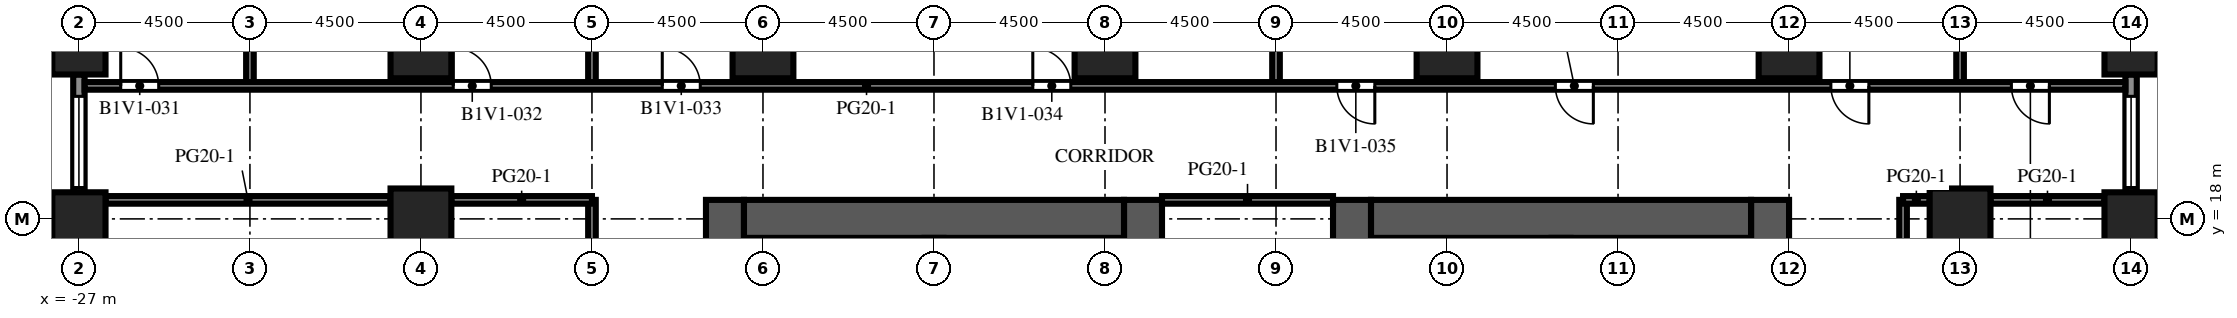
"""IFC4 building model, lengths in metres.
Left out: names, types, materials, properties, quantities, classifications, styles, units other than length and angle.
Written with IfcOpenShell. Run it as: python <this file> out.ifc"""

import sys

from ifc_helpers import new_model, si_unit, direction, frame, frame_2d, origin, origin_2d, place, context, subcontext, project, spatial, rectangle, extrude, element, fill, save


model = new_model("IFC4")
c1 = context("Model", 3, precision=1e-05, world=origin(), true_north=direction((0.0, 1.0)))
c2 = subcontext(c1, "Body", "Model", "MODEL_VIEW")
j1 = project(units=[si_unit("LENGTHUNIT", "METRE"), si_unit("PLANEANGLEUNIT", "RADIAN")], contexts=[c1])
p1 = place(None, origin())
s1 = spatial("IfcSite", under=j1, at=p1, CompositionType="ELEMENT")
p2 = place(p1, origin())
s2 = spatial("IfcBuilding", under=s1, at=p2, CompositionType="ELEMENT")
p3 = place(p2, frame((0.0, 0.0, 23.6)))
s3 = spatial("IfcBuildingStorey", under=s2, at=p3, CompositionType="ELEMENT", Elevation=23.6)
for number, where, z_axis, x_axis in (
    (1, (-27.0, 18.0, 0.0), (0.0, 0.0, 1.0), (1.0, 0.0, 0.0)),
    (2, (-27.0, 22.5, 0.0), (0.0, 0.0, 1.0), (1.0, 0.0, 0.0)),
    (3, (27.0, 18.0, 0.0), (0.0, 0.0, 1.0), (1.0, 0.0, 0.0)),
    (4, (27.0, 22.5, 0.0), (0.0, 0.0, 1.0), (1.0, 0.0, 0.0)),
):
    element("IfcColumn", number, at=place(p3, frame(where, z_axis=z_axis, x_axis=x_axis)), inside=s3, PredefinedType="COLUMN", context=c2, shape_type="SweptSolid", body=[
        extrude(rectangle(XDim=1.4, YDim=1.4, at=origin_2d()), origin(), (0.0, 0.0, 1.0), 4.1),
    ])
for number, where, z_axis, x_axis in (
    (5, (-18.0, 18.0, 0.0), (0.0, 0.0, 1.0), (1.0, 0.0, 0.0)),
    (6, (-18.0, 22.5, 0.0), (0.0, 0.0, 1.0), (1.0, 0.0, 0.0)),
    (7, (-9.0, 22.5, 0.0), (0.0, 0.0, 1.0), (1.0, 0.0, 0.0)),
    (8, (0.0, 22.5, 0.0), (0.0, 0.0, 1.0), (1.0, 0.0, 0.0)),
    (9, (9.0, 22.5, 0.0), (0.0, 0.0, 1.0), (1.0, 0.0, 0.0)),
    (10, (18.0, 22.5, 0.0), (0.0, 0.0, 1.0), (1.0, 0.0, 0.0)),
    (11, (22.5, 18.0, 0.0), (0.0, 0.0, 1.0), (1.0, 0.0, 0.0)),
):
    element("IfcColumn", number, at=place(p3, frame(where, z_axis=z_axis, x_axis=x_axis)), inside=s3, PredefinedType="COLUMN", context=c2, shape_type="SweptSolid", body=[
        extrude(rectangle(XDim=1.6, YDim=1.6, at=origin_2d()), origin(), (0.0, 0.0, 1.0), 4.1),
    ])
p4 = place(p3, frame((-10.0, -9.0, 0.0), z_axis=(0.0, 0.0, 1.0), x_axis=(0.0, 1.0, 0.0)))
e12 = element("IfcWall", 12, at=p4, inside=s3, PredefinedType="SHEAR", context=c2, shape_type="SweptSolid", body=[
    extrude(rectangle(XDim=27.5, YDim=1.0, at=frame_2d((13.75, 0.0))), origin(), (0.0, 0.0, 1.0), 4.1),
])
p5 = place(p4, frame((12.55, 0.0, 0.0)))
e13 = element("IfcOpeningElement", 13, at=p5, cuts=e12, PredefinedType="OPENING", context=c2, shape_type="SweptSolid", body=[
    extrude(rectangle(XDim=2.4, YDim=2.4, at=frame_2d((1.2, 1.2))), frame((0.0, 0.51, 0.0), z_axis=(0.0, -1.0, 0.0), x_axis=(1.0, 0.0, 0.0)), (0.0, 0.0, 1.0), 1.02),
])
p6 = place(p4, frame((6.825, 0.0, 0.0)))
e14 = element("IfcOpeningElement", 14, at=p6, cuts=e12, PredefinedType="OPENING", context=c2, shape_type="SweptSolid", body=[
    extrude(rectangle(XDim=1.2, YDim=2.1, at=frame_2d((0.6, 1.05))), frame((0.0, 0.51, 0.0), z_axis=(0.0, -1.0, 0.0), x_axis=(1.0, 0.0, 0.0)), (0.0, 0.0, 1.0), 1.02),
])
p7 = place(p4, frame((19.475, 0.0, 0.0)))
e15 = element("IfcOpeningElement", 15, at=p7, cuts=e12, PredefinedType="OPENING", context=c2, shape_type="SweptSolid", body=[
    extrude(rectangle(XDim=1.2, YDim=2.1, at=frame_2d((0.6, 1.05))), frame((0.0, 0.51, 0.0), z_axis=(0.0, -1.0, 0.0), x_axis=(1.0, 0.0, 0.0)), (0.0, 0.0, 1.0), 1.02),
])
p8 = place(p3, frame((1.0, -9.0, 0.0), z_axis=(0.0, 0.0, 1.0), x_axis=(0.0, 1.0, 0.0)))
e16 = element("IfcWall", 16, at=p8, inside=s3, PredefinedType="SHEAR", context=c2, shape_type="SweptSolid", body=[
    extrude(rectangle(XDim=27.5, YDim=1.0, at=frame_2d((13.75, 0.0))), origin(), (0.0, 0.0, 1.0), 4.1),
])
p9 = place(p8, frame((12.55, 0.0, 0.0)))
e17 = element("IfcOpeningElement", 17, at=p9, cuts=e16, PredefinedType="OPENING", context=c2, shape_type="SweptSolid", body=[
    extrude(rectangle(XDim=2.4, YDim=2.4, at=frame_2d((1.2, 1.2))), frame((0.0, 0.51, 0.0), z_axis=(0.0, -1.0, 0.0), x_axis=(1.0, 0.0, 0.0)), (0.0, 0.0, 1.0), 1.02),
])
p10 = place(p8, frame((3.955, 0.0, 0.0)))
e18 = element("IfcOpeningElement", 18, at=p10, cuts=e16, PredefinedType="OPENING", context=c2, shape_type="SweptSolid", body=[
    extrude(rectangle(XDim=0.905, YDim=2.1, at=frame_2d((0.453, 1.05))), frame((0.0, 0.51, 0.0), z_axis=(0.0, -1.0, 0.0), x_axis=(1.0, 0.0, 0.0)), (0.0, 0.0, 1.0), 1.02),
])
p11 = place(p8, frame((23.363, 0.0, 0.0)))
e19 = element("IfcOpeningElement", 19, at=p11, cuts=e16, PredefinedType="OPENING", context=c2, shape_type="SweptSolid", body=[
    extrude(rectangle(XDim=1.2, YDim=2.1, at=frame_2d((0.6, 1.05))), frame((0.0, 0.51, 0.0), z_axis=(0.0, -1.0, 0.0), x_axis=(1.0, 0.0, 0.0)), (0.0, 0.0, 1.0), 1.02),
])
p12 = place(p3, frame((-9.5, 18.0, 0.0), z_axis=(0.0, 0.0, 1.0), x_axis=(1.0, 0.0, 0.0)))
e20 = element("IfcWall", 20, at=p12, inside=s3, PredefinedType="SHEAR", context=c2, shape_type="SweptSolid", body=[
    extrude(rectangle(XDim=10.0, YDim=1.0, at=frame_2d((5.0, 0.0))), origin(), (0.0, 0.0, 1.0), 4.1),
])
p13 = place(p3, frame((6.5, -9.0, 0.0), z_axis=(0.0, 0.0, 1.0), x_axis=(0.0, 1.0, 0.0)))
e21 = element("IfcWall", 21, at=p13, inside=s3, PredefinedType="SHEAR", context=c2, shape_type="SweptSolid", body=[
    extrude(rectangle(XDim=27.5, YDim=1.0, at=frame_2d((13.75, 0.0))), origin(), (0.0, 0.0, 1.0), 4.1),
])
p14 = place(p13, frame((12.55, 0.0, 0.0)))
e22 = element("IfcOpeningElement", 22, at=p14, cuts=e21, PredefinedType="OPENING", context=c2, shape_type="SweptSolid", body=[
    extrude(rectangle(XDim=2.4, YDim=2.4, at=frame_2d((1.2, 1.2))), frame((0.0, 0.51, 0.0), z_axis=(0.0, -1.0, 0.0), x_axis=(1.0, 0.0, 0.0)), (0.0, 0.0, 1.0), 1.02),
])
p15 = place(p13, frame((3.955, 0.0, 0.0)))
e23 = element("IfcOpeningElement", 23, at=p15, cuts=e21, PredefinedType="OPENING", context=c2, shape_type="SweptSolid", body=[
    extrude(rectangle(XDim=0.905, YDim=2.1, at=frame_2d((0.453, 1.05))), frame((0.0, 0.51, 0.0), z_axis=(0.0, -1.0, 0.0), x_axis=(1.0, 0.0, 0.0)), (0.0, 0.0, 1.0), 1.02),
])
p16 = place(p13, frame((23.363, 0.0, 0.0)))
e24 = element("IfcOpeningElement", 24, at=p16, cuts=e21, PredefinedType="OPENING", context=c2, shape_type="SweptSolid", body=[
    extrude(rectangle(XDim=1.2, YDim=2.1, at=frame_2d((0.6, 1.05))), frame((0.0, 0.51, 0.0), z_axis=(0.0, -1.0, 0.0), x_axis=(1.0, 0.0, 0.0)), (0.0, 0.0, 1.0), 1.02),
])
p17 = place(p3, frame((17.5, -9.0, 0.0), z_axis=(0.0, 0.0, 1.0), x_axis=(0.0, 1.0, 0.0)))
e25 = element("IfcWall", 25, at=p17, inside=s3, PredefinedType="SHEAR", context=c2, shape_type="SweptSolid", body=[
    extrude(rectangle(XDim=27.5, YDim=1.0, at=frame_2d((13.75, 0.0))), origin(), (0.0, 0.0, 1.0), 4.1),
])
p18 = place(p17, frame((12.55, 0.0, 0.0)))
e26 = element("IfcOpeningElement", 26, at=p18, cuts=e25, PredefinedType="OPENING", context=c2, shape_type="SweptSolid", body=[
    extrude(rectangle(XDim=2.4, YDim=2.4, at=frame_2d((1.2, 1.2))), frame((0.0, 0.51, 0.0), z_axis=(0.0, -1.0, 0.0), x_axis=(1.0, 0.0, 0.0)), (0.0, 0.0, 1.0), 1.02),
])
p19 = place(p17, frame((6.825, 0.0, 0.0)))
e27 = element("IfcOpeningElement", 27, at=p19, cuts=e25, PredefinedType="OPENING", context=c2, shape_type="SweptSolid", body=[
    extrude(rectangle(XDim=1.2, YDim=2.1, at=frame_2d((0.6, 1.05))), frame((0.0, 0.51, 0.0), z_axis=(0.0, -1.0, 0.0), x_axis=(1.0, 0.0, 0.0)), (0.0, 0.0, 1.0), 1.02),
])
p20 = place(p17, frame((19.475, 0.0, 0.0)))
e28 = element("IfcOpeningElement", 28, at=p20, cuts=e25, PredefinedType="OPENING", context=c2, shape_type="SweptSolid", body=[
    extrude(rectangle(XDim=1.2, YDim=2.1, at=frame_2d((0.6, 1.05))), frame((0.0, 0.51, 0.0), z_axis=(0.0, -1.0, 0.0), x_axis=(1.0, 0.0, 0.0)), (0.0, 0.0, 1.0), 1.02),
])
p21 = place(p3, frame((7.0, 18.0, 0.0), z_axis=(0.0, 0.0, 1.0), x_axis=(1.0, 0.0, 0.0)))
e29 = element("IfcWall", 29, at=p21, inside=s3, PredefinedType="SHEAR", context=c2, shape_type="SweptSolid", body=[
    extrude(rectangle(XDim=10.0, YDim=1.0, at=frame_2d((5.0, 0.0))), origin(), (0.0, 0.0, 1.0), 4.1),
])
p22 = place(p3, frame((27.0, 21.8, 0.0), z_axis=(0.0, 0.0, 1.0), x_axis=(0.0, -1.0, 0.0)))
e30 = element("IfcWall", 30, at=p22, inside=s3, PredefinedType="SOLIDWALL", context=c2, shape_type="SweptSolid", body=[
    extrude(rectangle(XDim=3.1, YDim=0.3, at=frame_2d((1.55, 0.0))), origin(), (0.0, 0.0, 1.0), 2.75),
])
p23 = place(p22, frame((0.575, 0.0, 0.8)))
e31 = element("IfcOpeningElement", 31, at=p23, cuts=e30, PredefinedType="OPENING", context=c2, shape_type="SweptSolid", body=[
    extrude(rectangle(XDim=2.4, YDim=1.7, at=frame_2d((1.2, 0.85))), frame((0.0, 0.16, 0.0), z_axis=(0.0, -1.0, 0.0), x_axis=(1.0, 0.0, 0.0)), (0.0, 0.0, 1.0), 0.32),
])
p24 = place(p3, frame((-27.0, 18.7, 0.0), z_axis=(0.0, 0.0, 1.0), x_axis=(0.0, 1.0, 0.0)))
e32 = element("IfcWall", 32, at=p24, inside=s3, PredefinedType="SOLIDWALL", context=c2, shape_type="SweptSolid", body=[
    extrude(rectangle(XDim=3.1, YDim=0.3, at=frame_2d((1.55, 0.0))), origin(), (0.0, 0.0, 1.0), 2.75),
])
p25 = place(p24, frame((0.125, 0.0, 0.8)))
e33 = element("IfcOpeningElement", 33, at=p25, cuts=e32, PredefinedType="OPENING", context=c2, shape_type="SweptSolid", body=[
    extrude(rectangle(XDim=2.4, YDim=1.7, at=frame_2d((1.2, 0.85))), frame((0.0, 0.16, 0.0), z_axis=(0.0, -1.0, 0.0), x_axis=(1.0, 0.0, 0.0)), (0.0, 0.0, 1.0), 0.32),
])
p26 = place(p3, frame((-22.5, 21.5, 0.0), z_axis=(0.0, 0.0, 1.0), x_axis=(0.0, 1.0, 0.0)))
e34 = element("IfcWall", 34, at=p26, inside=s3, PredefinedType="PARTITIONING", context=c2, shape_type="SweptSolid", body=[
    extrude(rectangle(XDim=4.8, YDim=0.2, at=frame_2d((2.4, 0.0))), origin(), (0.0, 0.0, 1.0), 3.65),
])
p27 = place(p3, frame((-13.5, -9.0, 0.0), z_axis=(0.0, 0.0, 1.0), x_axis=(0.0, 1.0, 0.0)))
e35 = element("IfcWall", 35, at=p27, inside=s3, PredefinedType="PARTITIONING", context=c2, shape_type="SweptSolid", body=[
    extrude(rectangle(XDim=27.5, YDim=0.2, at=frame_2d((13.75, 0.0))), origin(), (0.0, 0.0, 1.0), 3.65),
])
p28 = place(p27, frame((8.6, 0.0, 0.0)))
e36 = element("IfcOpeningElement", 36, at=p28, cuts=e35, PredefinedType="OPENING", context=c2, shape_type="SweptSolid", body=[
    extrude(rectangle(XDim=1.0, YDim=2.1, at=frame_2d((0.5, 1.05))), frame((0.0, 0.11, 0.0), z_axis=(0.0, -1.0, 0.0), x_axis=(1.0, 0.0, 0.0)), (0.0, 0.0, 1.0), 0.22),
])
p29 = place(p27, frame((15.1, 0.0, 0.0)))
e37 = element("IfcOpeningElement", 37, at=p29, cuts=e35, PredefinedType="OPENING", context=c2, shape_type="SweptSolid", body=[
    extrude(rectangle(XDim=1.0, YDim=2.1, at=frame_2d((0.5, 1.05))), frame((0.0, 0.11, 0.0), z_axis=(0.0, -1.0, 0.0), x_axis=(1.0, 0.0, 0.0)), (0.0, 0.0, 1.0), 0.22),
])
p30 = place(p27, frame((21.6, 0.0, 0.0)))
e38 = element("IfcOpeningElement", 38, at=p30, cuts=e35, PredefinedType="OPENING", context=c2, shape_type="SweptSolid", body=[
    extrude(rectangle(XDim=1.0, YDim=2.1, at=frame_2d((0.5, 1.05))), frame((0.0, 0.11, 0.0), z_axis=(0.0, -1.0, 0.0), x_axis=(1.0, 0.0, 0.0)), (0.0, 0.0, 1.0), 0.22),
])
for number, where, z_axis, x_axis in (
    (39, (-13.5, 21.5, 0.0), (0.0, 0.0, 1.0), (0.0, 1.0, 0.0)),
    (40, (4.5, 21.5, 0.0), (0.0, 0.0, 1.0), (0.0, 1.0, 0.0)),
):
    element("IfcWall", number, at=place(p3, frame(where, z_axis=z_axis, x_axis=x_axis)), inside=s3, PredefinedType="PARTITIONING", context=c2, shape_type="SweptSolid", body=[
        extrude(rectangle(XDim=4.8, YDim=0.2, at=frame_2d((2.4, 0.0))), origin(), (0.0, 0.0, 1.0), 3.65),
    ])
p31 = place(p3, frame((21.0, 18.5, 0.0), z_axis=(0.0, 0.0, 1.0), x_axis=(0.0, -1.0, 0.0)))
e41 = element("IfcWall", 41, at=p31, inside=s3, PredefinedType="PARTITIONING", context=c2, shape_type="SweptSolid", body=[
    extrude(rectangle(XDim=27.5, YDim=0.2, at=frame_2d((13.75, 0.0))), origin(), (0.0, 0.0, 1.0), 3.65),
])
p32 = place(p31, frame((19.4, 0.0, 0.0)))
e42 = element("IfcOpeningElement", 42, at=p32, cuts=e41, PredefinedType="OPENING", context=c2, shape_type="SweptSolid", body=[
    extrude(rectangle(XDim=1.0, YDim=2.1, at=frame_2d((0.5, 1.05))), frame((0.0, 0.11, 0.0), z_axis=(0.0, -1.0, 0.0), x_axis=(1.0, 0.0, 0.0)), (0.0, 0.0, 1.0), 0.22),
])
p33 = place(p31, frame((11.15, 0.0, 0.0)))
e43 = element("IfcOpeningElement", 43, at=p33, cuts=e41, PredefinedType="OPENING", context=c2, shape_type="SweptSolid", body=[
    extrude(rectangle(XDim=1.0, YDim=2.1, at=frame_2d((0.5, 1.05))), frame((0.0, 0.11, 0.0), z_axis=(0.0, -1.0, 0.0), x_axis=(1.0, 0.0, 0.0)), (0.0, 0.0, 1.0), 0.22),
])
p34 = place(p31, frame((4.65, 0.0, 0.0)))
e44 = element("IfcOpeningElement", 44, at=p34, cuts=e41, PredefinedType="OPENING", context=c2, shape_type="SweptSolid", body=[
    extrude(rectangle(XDim=1.0, YDim=2.1, at=frame_2d((0.5, 1.05))), frame((0.0, 0.11, 0.0), z_axis=(0.0, -1.0, 0.0), x_axis=(1.0, 0.0, 0.0)), (0.0, 0.0, 1.0), 0.22),
])
p35 = place(p3, frame((22.5, 21.5, 0.0), z_axis=(0.0, 0.0, 1.0), x_axis=(0.0, 1.0, 0.0)))
e45 = element("IfcWall", 45, at=p35, inside=s3, PredefinedType="PARTITIONING", context=c2, shape_type="SweptSolid", body=[
    extrude(rectangle(XDim=4.8, YDim=0.2, at=frame_2d((2.4, 0.0))), origin(), (0.0, 0.0, 1.0), 3.65),
])
p36 = place(p3, frame((-26.3, 18.5, 0.0), z_axis=(0.0, 0.0, 1.0), x_axis=(1.0, 0.0, 0.0)))
e46 = element("IfcWall", 46, at=p36, inside=s3, PredefinedType="PARTITIONING", context=c2, shape_type="SweptSolid", body=[
    extrude(rectangle(XDim=7.5, YDim=0.2, at=frame_2d((3.75, 0.0))), origin(), (0.0, 0.0, 1.0), 3.65),
])
p37 = place(p3, frame((-17.2, 18.5, 0.0), z_axis=(0.0, 0.0, 1.0), x_axis=(1.0, 0.0, 0.0)))
e47 = element("IfcWall", 47, at=p37, inside=s3, PredefinedType="PARTITIONING", context=c2, shape_type="SweptSolid", body=[
    extrude(rectangle(XDim=3.7, YDim=0.2, at=frame_2d((1.85, 0.0))), origin(), (0.0, 0.0, 1.0), 3.65),
])
p38 = place(p3, frame((1.5, 18.5, 0.0), z_axis=(0.0, 0.0, 1.0), x_axis=(1.0, 0.0, 0.0)))
e48 = element("IfcWall", 48, at=p38, inside=s3, PredefinedType="PARTITIONING", context=c2, shape_type="SweptSolid", body=[
    extrude(rectangle(XDim=4.5, YDim=0.2, at=frame_2d((2.25, 0.0))), origin(), (0.0, 0.0, 1.0), 3.65),
])
p39 = place(p3, frame((21.0, 18.5, 0.0), z_axis=(0.0, 0.0, 1.0), x_axis=(1.0, 0.0, 0.0)))
e49 = element("IfcWall", 49, at=p39, inside=s3, PredefinedType="PARTITIONING", context=c2, shape_type="SweptSolid", body=[
    extrude(rectangle(XDim=0.7, YDim=0.2, at=frame_2d((0.35, 0.0))), origin(), (0.0, 0.0, 1.0), 3.65),
])
p40 = place(p3, frame((23.3, 18.5, 0.0), z_axis=(0.0, 0.0, 1.0), x_axis=(1.0, 0.0, 0.0)))
e50 = element("IfcWall", 50, at=p40, inside=s3, PredefinedType="PARTITIONING", context=c2, shape_type="SweptSolid", body=[
    extrude(rectangle(XDim=3.0, YDim=0.2, at=frame_2d((1.5, 0.0))), origin(), (0.0, 0.0, 1.0), 3.65),
])
p41 = place(p3, frame((-26.85, 21.5, 0.0), z_axis=(0.0, 0.0, 1.0), x_axis=(1.0, 0.0, 0.0)))
e51 = element("IfcWall", 51, at=p41, inside=s3, PredefinedType="PARTITIONING", context=c2, shape_type="SweptSolid", body=[
    extrude(rectangle(XDim=53.7, YDim=0.2, at=frame_2d((26.85, 0.0))), origin(), (0.0, 0.0, 1.0), 3.65),
])
p42 = place(p41, frame((0.95, 0.0, 0.0)))
e52 = element("IfcOpeningElement", 52, at=p42, cuts=e51, PredefinedType="OPENING", context=c2, shape_type="SweptSolid", body=[
    extrude(rectangle(XDim=1.0, YDim=2.1, at=frame_2d((0.5, 1.05))), frame((0.0, 0.11, 0.0), z_axis=(0.0, -1.0, 0.0), x_axis=(1.0, 0.0, 0.0)), (0.0, 0.0, 1.0), 0.22),
])
p43 = place(p41, frame((9.7, 0.0, 0.0)))
e53 = element("IfcOpeningElement", 53, at=p43, cuts=e51, PredefinedType="OPENING", context=c2, shape_type="SweptSolid", body=[
    extrude(rectangle(XDim=1.0, YDim=2.1, at=frame_2d((0.5, 1.05))), frame((0.0, 0.11, 0.0), z_axis=(0.0, -1.0, 0.0), x_axis=(1.0, 0.0, 0.0)), (0.0, 0.0, 1.0), 0.22),
])
p44 = place(p41, frame((15.2, 0.0, 0.0)))
e54 = element("IfcOpeningElement", 54, at=p44, cuts=e51, PredefinedType="OPENING", context=c2, shape_type="SweptSolid", body=[
    extrude(rectangle(XDim=1.0, YDim=2.1, at=frame_2d((0.5, 1.05))), frame((0.0, 0.11, 0.0), z_axis=(0.0, -1.0, 0.0), x_axis=(1.0, 0.0, 0.0)), (0.0, 0.0, 1.0), 0.22),
])
p45 = place(p41, frame((24.95, 0.0, 0.0)))
e55 = element("IfcOpeningElement", 55, at=p45, cuts=e51, PredefinedType="OPENING", context=c2, shape_type="SweptSolid", body=[
    extrude(rectangle(XDim=1.0, YDim=2.1, at=frame_2d((0.5, 1.05))), frame((0.0, 0.11, 0.0), z_axis=(0.0, -1.0, 0.0), x_axis=(1.0, 0.0, 0.0)), (0.0, 0.0, 1.0), 0.22),
])
p46 = place(p41, frame((32.95, 0.0, 0.0)))
e56 = element("IfcOpeningElement", 56, at=p46, cuts=e51, PredefinedType="OPENING", context=c2, shape_type="SweptSolid", body=[
    extrude(rectangle(XDim=1.0, YDim=2.1, at=frame_2d((0.5, 1.05))), frame((0.0, 0.11, 0.0), z_axis=(0.0, -1.0, 0.0), x_axis=(1.0, 0.0, 0.0)), (0.0, 0.0, 1.0), 0.22),
])
p47 = place(p41, frame((38.7, 0.0, 0.0)))
e57 = element("IfcOpeningElement", 57, at=p47, cuts=e51, PredefinedType="OPENING", context=c2, shape_type="SweptSolid", body=[
    extrude(rectangle(XDim=1.0, YDim=2.1, at=frame_2d((0.5, 1.05))), frame((0.0, 0.11, 0.0), z_axis=(0.0, -1.0, 0.0), x_axis=(1.0, 0.0, 0.0)), (0.0, 0.0, 1.0), 0.22),
])
p48 = place(p41, frame((45.95, 0.0, 0.0)))
e58 = element("IfcOpeningElement", 58, at=p48, cuts=e51, PredefinedType="OPENING", context=c2, shape_type="SweptSolid", body=[
    extrude(rectangle(XDim=1.0, YDim=2.1, at=frame_2d((0.5, 1.05))), frame((0.0, 0.11, 0.0), z_axis=(0.0, -1.0, 0.0), x_axis=(1.0, 0.0, 0.0)), (0.0, 0.0, 1.0), 0.22),
])
p49 = place(p41, frame((50.7, 0.0, 0.0)))
e59 = element("IfcOpeningElement", 59, at=p49, cuts=e51, PredefinedType="OPENING", context=c2, shape_type="SweptSolid", body=[
    extrude(rectangle(XDim=1.0, YDim=2.1, at=frame_2d((0.5, 1.05))), frame((0.0, 0.11, 0.0), z_axis=(0.0, -1.0, 0.0), x_axis=(1.0, 0.0, 0.0)), (0.0, 0.0, 1.0), 0.22),
])
p50 = place(p23, origin())
e60 = element("IfcWindow", 60, at=p50, inside=s3, PartitioningType="SINGLE_PANEL", PredefinedType="WINDOW", context=c2, shape_type="SweptSolid", body=[
    extrude(rectangle(XDim=2.4, YDim=1.7, at=frame_2d((1.2, 0.85))), frame((0.0, 0.03, 0.0), z_axis=(0.0, -1.0, 0.0), x_axis=(1.0, 0.0, 0.0)), (0.0, 0.0, 1.0), 0.06),
])
fill(e31, e60)
p51 = place(p25, origin())
e61 = element("IfcWindow", 61, at=p51, inside=s3, PartitioningType="SINGLE_PANEL", PredefinedType="WINDOW", context=c2, shape_type="SweptSolid", body=[
    extrude(rectangle(XDim=2.4, YDim=1.7, at=frame_2d((1.2, 0.85))), frame((0.0, 0.03, 0.0), z_axis=(0.0, -1.0, 0.0), x_axis=(1.0, 0.0, 0.0)), (0.0, 0.0, 1.0), 0.06),
])
fill(e33, e61)
p52 = place(p42, origin())
e62 = element("IfcDoor", 62, at=p52, inside=s3, OperationType="SINGLE_SWING_LEFT", PredefinedType="DOOR", context=c2, shape_type="SweptSolid", body=[
    extrude(rectangle(XDim=1.0, YDim=2.1, at=frame_2d((0.5, 1.05))), frame((0.0, 0.025, 0.0), z_axis=(0.0, -1.0, 0.0), x_axis=(1.0, 0.0, 0.0)), (0.0, 0.0, 1.0), 0.05),
])
fill(e52, e62)
p53 = place(p43, origin())
e63 = element("IfcDoor", 63, at=p53, inside=s3, OperationType="SINGLE_SWING_LEFT", PredefinedType="DOOR", context=c2, shape_type="SweptSolid", body=[
    extrude(rectangle(XDim=1.0, YDim=2.1, at=frame_2d((0.5, 1.05))), frame((0.0, 0.025, 0.0), z_axis=(0.0, -1.0, 0.0), x_axis=(1.0, 0.0, 0.0)), (0.0, 0.0, 1.0), 0.05),
])
fill(e53, e63)
p54 = place(p44, origin())
e64 = element("IfcDoor", 64, at=p54, inside=s3, OperationType="SINGLE_SWING_LEFT", PredefinedType="DOOR", context=c2, shape_type="SweptSolid", body=[
    extrude(rectangle(XDim=1.0, YDim=2.1, at=frame_2d((0.5, 1.05))), frame((0.0, 0.025, 0.0), z_axis=(0.0, -1.0, 0.0), x_axis=(1.0, 0.0, 0.0)), (0.0, 0.0, 1.0), 0.05),
])
fill(e54, e64)
p55 = place(p45, origin())
e65 = element("IfcDoor", 65, at=p55, inside=s3, OperationType="SINGLE_SWING_LEFT", PredefinedType="DOOR", context=c2, shape_type="SweptSolid", body=[
    extrude(rectangle(XDim=1.0, YDim=2.1, at=frame_2d((0.5, 1.05))), frame((0.0, 0.025, 0.0), z_axis=(0.0, -1.0, 0.0), x_axis=(1.0, 0.0, 0.0)), (0.0, 0.0, 1.0), 0.05),
])
fill(e55, e65)
p56 = place(p46, origin())
e66 = element("IfcDoor", 66, at=p56, inside=s3, OperationType="SINGLE_SWING_RIGHT", PredefinedType="DOOR", context=c2, shape_type="SweptSolid", body=[
    extrude(rectangle(XDim=1.0, YDim=2.1, at=frame_2d((0.5, 1.05))), frame((0.0, 0.025, 0.0), z_axis=(0.0, -1.0, 0.0), x_axis=(1.0, 0.0, 0.0)), (0.0, 0.0, 1.0), 0.05),
])
fill(e56, e66)
p57 = place(p47, origin())
e67 = element("IfcDoor", 67, at=p57, inside=s3, OperationType="SINGLE_SWING_RIGHT", PredefinedType="DOOR", context=c2, shape_type="SweptSolid", body=[
    extrude(rectangle(XDim=1.0, YDim=2.1, at=frame_2d((0.5, 1.05))), frame((0.0, 0.025, 0.0), z_axis=(0.0, -1.0, 0.0), x_axis=(1.0, 0.0, 0.0)), (0.0, 0.0, 1.0), 0.05),
])
fill(e57, e67)
p58 = place(p48, origin())
e68 = element("IfcDoor", 68, at=p58, inside=s3, OperationType="SINGLE_SWING_RIGHT", PredefinedType="DOOR", context=c2, shape_type="SweptSolid", body=[
    extrude(rectangle(XDim=1.0, YDim=2.1, at=frame_2d((0.5, 1.05))), frame((0.0, 0.025, 0.0), z_axis=(0.0, -1.0, 0.0), x_axis=(1.0, 0.0, 0.0)), (0.0, 0.0, 1.0), 0.05),
])
fill(e58, e68)
p59 = place(p49, origin())
e69 = element("IfcDoor", 69, at=p59, inside=s3, OperationType="SINGLE_SWING_RIGHT", PredefinedType="DOOR", context=c2, shape_type="SweptSolid", body=[
    extrude(rectangle(XDim=1.0, YDim=2.1, at=frame_2d((0.5, 1.05))), frame((0.0, 0.025, 0.0), z_axis=(0.0, -1.0, 0.0), x_axis=(1.0, 0.0, 0.0)), (0.0, 0.0, 1.0), 0.05),
])
fill(e59, e69)
save(model, sys.argv[1])
